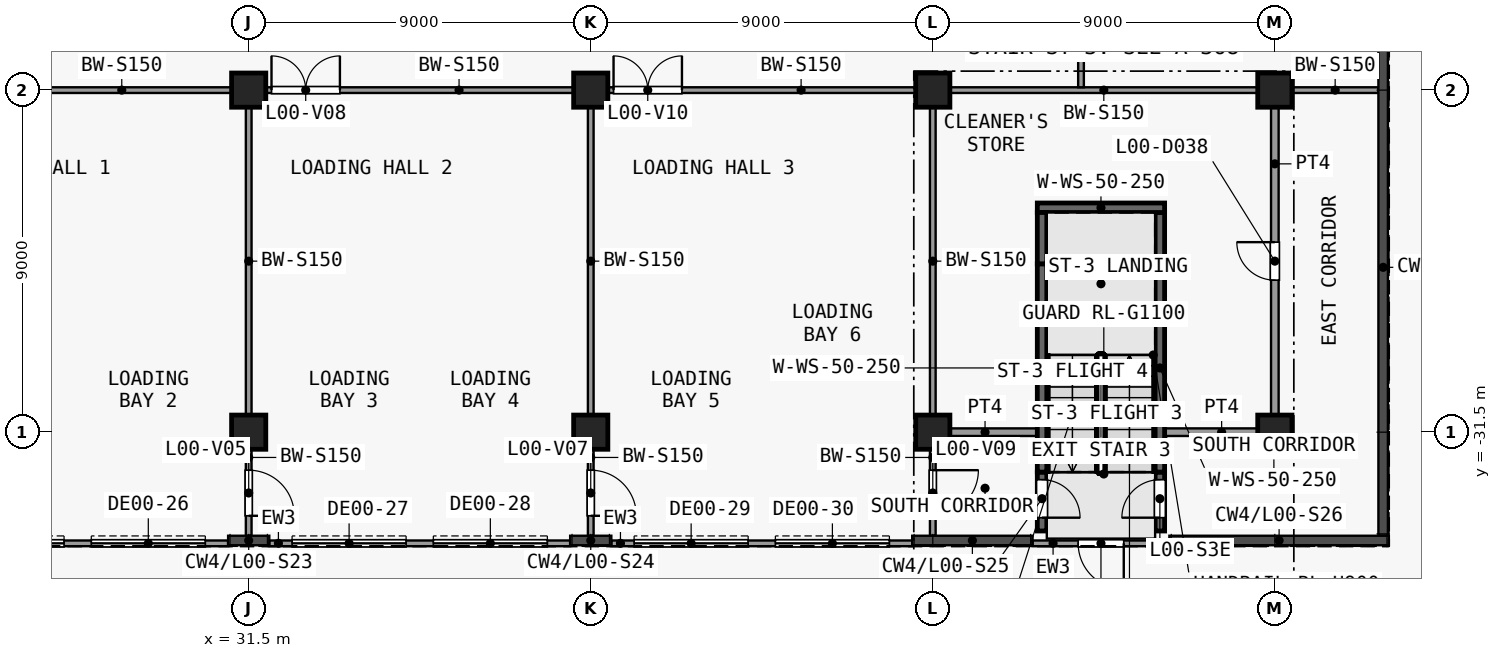
"""IFC4 building model, lengths in metres.
Left out: names, types, materials, properties, quantities, classifications, styles, units other than length and angle.
Written with IfcOpenShell. Run it as: python <this file> out.ifc"""

import sys

from ifc_helpers import new_model, si_unit, direction, frame, frame_2d, origin, origin_2d, place, context, subcontext, project, spatial, rectangle, extrude, element, fill, save


model = new_model("IFC4")
c1 = context("Model", 3, precision=1e-05, world=origin(), true_north=direction((0.0, 1.0)))
c2 = subcontext(c1, "Body", "Model", "MODEL_VIEW")
j1 = project(units=[si_unit("LENGTHUNIT", "METRE"), si_unit("PLANEANGLEUNIT", "RADIAN")], contexts=[c1])
p1 = place(None, origin())
s1 = spatial("IfcSite", under=j1, at=p1, CompositionType="ELEMENT")
p2 = place(p1, origin())
s2 = spatial("IfcBuilding", under=s1, at=p2, CompositionType="ELEMENT")
p3 = place(p2, origin())
s3 = spatial("IfcBuildingStorey", under=s2, at=p3, CompositionType="ELEMENT", Elevation=0.0)
for number, where, z_axis, x_axis in (
    (1, (31.5, -31.5, 0.0), (0.0, 0.0, 1.0), (1.0, 0.0, 0.0)),
    (2, (31.5, -22.5, 0.0), (0.0, 0.0, 1.0), (1.0, 0.0, 0.0)),
    (3, (40.5, -31.5, 0.0), (0.0, 0.0, 1.0), (1.0, 0.0, 0.0)),
    (4, (40.5, -22.5, 0.0), (0.0, 0.0, 1.0), (1.0, 0.0, 0.0)),
    (5, (49.5, -31.5, 0.0), (0.0, 0.0, 1.0), (1.0, 0.0, 0.0)),
    (6, (49.5, -22.5, 0.0), (0.0, 0.0, 1.0), (1.0, 0.0, 0.0)),
    (7, (58.5, -31.5, 0.0), (0.0, 0.0, 1.0), (1.0, 0.0, 0.0)),
    (8, (58.5, -22.5, 0.0), (0.0, 0.0, 1.0), (1.0, 0.0, 0.0)),
):
    element("IfcColumn", number, at=place(p3, frame(where, z_axis=z_axis, x_axis=x_axis)), inside=s3, PredefinedType="COLUMN", context=c2, shape_type="SweptSolid", body=[
        extrude(rectangle(XDim=0.9, YDim=0.9, at=origin_2d()), origin(), (0.0, 0.0, 1.0), 8.0),
    ])
p4 = place(p3, frame((23.25, -22.5, 0.0), z_axis=(0.0, 0.0, 1.0), x_axis=(1.0, 0.0, 0.0)))
e9 = element("IfcWall", 9, at=p4, inside=s3, PredefinedType="PARTITIONING", context=c2, shape_type="SweptSolid", body=[
    extrude(rectangle(XDim=7.8, YDim=0.15, at=frame_2d((3.9, 0.0))), origin(), (0.0, 0.0, 1.0), 7.65),
])
p5 = place(p4, frame((0.1, 0.0, 0.0)))
e10 = element("IfcOpeningElement", 10, at=p5, cuts=e9, PredefinedType="OPENING", context=c2, shape_type="SweptSolid", body=[
    extrude(rectangle(XDim=1.8, YDim=2.1, at=frame_2d((0.9, 1.05))), frame((0.0, 0.085, 0.0), z_axis=(0.0, -1.0, 0.0), x_axis=(1.0, 0.0, 0.0)), (0.0, 0.0, 1.0), 0.17),
])
p6 = place(p3, frame((31.95, -22.5, 0.0), z_axis=(0.0, 0.0, 1.0), x_axis=(1.0, 0.0, 0.0)))
e11 = element("IfcWall", 11, at=p6, inside=s3, PredefinedType="PARTITIONING", context=c2, shape_type="SweptSolid", body=[
    extrude(rectangle(XDim=8.1, YDim=0.15, at=frame_2d((4.05, 0.0))), origin(), (0.0, 0.0, 1.0), 7.65),
])
p7 = place(p6, frame((0.15, 0.0, 0.0)))
e12 = element("IfcOpeningElement", 12, at=p7, cuts=e11, PredefinedType="OPENING", context=c2, shape_type="SweptSolid", body=[
    extrude(rectangle(XDim=1.8, YDim=2.1, at=frame_2d((0.9, 1.05))), frame((0.0, 0.085, 0.0), z_axis=(0.0, -1.0, 0.0), x_axis=(1.0, 0.0, 0.0)), (0.0, 0.0, 1.0), 0.17),
])
p8 = place(p3, frame((40.95, -22.5, 0.0), z_axis=(0.0, 0.0, 1.0), x_axis=(1.0, 0.0, 0.0)))
e13 = element("IfcWall", 13, at=p8, inside=s3, PredefinedType="PARTITIONING", context=c2, shape_type="SweptSolid", body=[
    extrude(rectangle(XDim=8.1, YDim=0.15, at=frame_2d((4.05, 0.0))), origin(), (0.0, 0.0, 1.0), 7.65),
])
p9 = place(p8, frame((0.15, 0.0, 0.0)))
e14 = element("IfcOpeningElement", 14, at=p9, cuts=e13, PredefinedType="OPENING", context=c2, shape_type="SweptSolid", body=[
    extrude(rectangle(XDim=1.8, YDim=2.1, at=frame_2d((0.9, 1.05))), frame((0.0, 0.085, 0.0), z_axis=(0.0, -1.0, 0.0), x_axis=(1.0, 0.0, 0.0)), (0.0, 0.0, 1.0), 0.17),
])
p10 = place(p3, frame((49.95, -22.5, 0.0), z_axis=(0.0, 0.0, 1.0), x_axis=(1.0, 0.0, 0.0)))
e15 = element("IfcWall", 15, at=p10, inside=s3, PredefinedType="PARTITIONING", context=c2, shape_type="SweptSolid", body=[
    extrude(rectangle(XDim=8.1, YDim=0.15, at=frame_2d((4.05, 0.0))), origin(), (0.0, 0.0, 1.0), 7.65),
])
p11 = place(p3, frame((58.95, -22.5, 0.0), z_axis=(0.0, 0.0, 1.0), x_axis=(1.0, 0.0, 0.0)))
e16 = element("IfcWall", 16, at=p11, inside=s3, PredefinedType="PARTITIONING", context=c2, shape_type="SweptSolid", body=[
    extrude(rectangle(XDim=2.275, YDim=0.15, at=frame_2d((1.138, 0.0))), origin(), (0.0, 0.0, 1.0), 7.65),
])
p12 = place(p3, frame((31.5, -31.95, 0.0), z_axis=(0.0, 0.0, 1.0), x_axis=(0.0, -1.0, 0.0)))
e17 = element("IfcWall", 17, at=p12, inside=s3, PredefinedType="PARTITIONING", context=c2, shape_type="SweptSolid", body=[
    extrude(rectangle(XDim=2.275, YDim=0.15, at=frame_2d((1.138, 0.0))), origin(), (0.0, 0.0, 1.0), 7.65),
])
p13 = place(p12, frame((0.55, 0.0, 0.0)))
e18 = element("IfcOpeningElement", 18, at=p13, cuts=e17, PredefinedType="OPENING", context=c2, shape_type="SweptSolid", body=[
    extrude(rectangle(XDim=1.2, YDim=2.1, at=frame_2d((0.6, 1.05))), frame((0.0, 0.085, 0.0), z_axis=(0.0, -1.0, 0.0), x_axis=(1.0, 0.0, 0.0)), (0.0, 0.0, 1.0), 0.17),
])
p14 = place(p3, frame((31.5, -31.05, 0.0), z_axis=(0.0, 0.0, 1.0), x_axis=(0.0, 1.0, 0.0)))
e19 = element("IfcWall", 19, at=p14, inside=s3, PredefinedType="PARTITIONING", context=c2, shape_type="SweptSolid", body=[
    extrude(rectangle(XDim=8.1, YDim=0.15, at=frame_2d((4.05, 0.0))), origin(), (0.0, 0.0, 1.0), 7.65),
])
p15 = place(p3, frame((40.5, -31.95, 0.0), z_axis=(0.0, 0.0, 1.0), x_axis=(0.0, -1.0, 0.0)))
e20 = element("IfcWall", 20, at=p15, inside=s3, PredefinedType="PARTITIONING", context=c2, shape_type="SweptSolid", body=[
    extrude(rectangle(XDim=2.275, YDim=0.15, at=frame_2d((1.138, 0.0))), origin(), (0.0, 0.0, 1.0), 7.65),
])
p16 = place(p15, frame((0.55, 0.0, 0.0)))
e21 = element("IfcOpeningElement", 21, at=p16, cuts=e20, PredefinedType="OPENING", context=c2, shape_type="SweptSolid", body=[
    extrude(rectangle(XDim=1.2, YDim=2.1, at=frame_2d((0.6, 1.05))), frame((0.0, 0.085, 0.0), z_axis=(0.0, -1.0, 0.0), x_axis=(1.0, 0.0, 0.0)), (0.0, 0.0, 1.0), 0.17),
])
p17 = place(p3, frame((40.5, -31.05, 0.0), z_axis=(0.0, 0.0, 1.0), x_axis=(0.0, 1.0, 0.0)))
e22 = element("IfcWall", 22, at=p17, inside=s3, PredefinedType="PARTITIONING", context=c2, shape_type="SweptSolid", body=[
    extrude(rectangle(XDim=8.1, YDim=0.15, at=frame_2d((4.05, 0.0))), origin(), (0.0, 0.0, 1.0), 7.65),
])
p18 = place(p3, frame((49.5, -31.95, 0.0), z_axis=(0.0, 0.0, 1.0), x_axis=(0.0, -1.0, 0.0)))
e23 = element("IfcWall", 23, at=p18, inside=s3, PredefinedType="PARTITIONING", context=c2, shape_type="SweptSolid", body=[
    extrude(rectangle(XDim=2.275, YDim=0.15, at=frame_2d((1.138, 0.0))), origin(), (0.0, 0.0, 1.0), 7.65),
])
p19 = place(p18, frame((0.55, 0.0, 0.0)))
e24 = element("IfcOpeningElement", 24, at=p19, cuts=e23, PredefinedType="OPENING", context=c2, shape_type="SweptSolid", body=[
    extrude(rectangle(XDim=1.2, YDim=2.1, at=frame_2d((0.6, 1.05))), frame((0.0, 0.085, 0.0), z_axis=(0.0, -1.0, 0.0), x_axis=(1.0, 0.0, 0.0)), (0.0, 0.0, 1.0), 0.17),
])
p20 = place(p3, frame((49.5, -31.05, 0.0), z_axis=(0.0, 0.0, 1.0), x_axis=(0.0, 1.0, 0.0)))
e25 = element("IfcWall", 25, at=p20, inside=s3, PredefinedType="PARTITIONING", context=c2, shape_type="SweptSolid", body=[
    extrude(rectangle(XDim=8.1, YDim=0.15, at=frame_2d((4.05, 0.0))), origin(), (0.0, 0.0, 1.0), 7.65),
])
p21 = place(p3, frame((53.4, -22.425, 0.0), z_axis=(0.0, 0.0, 1.0), x_axis=(0.0, 1.0, 0.0)))
e26 = element("IfcWall", 26, at=p21, inside=s3, PredefinedType="PARTITIONING", context=c2, shape_type="SweptSolid", body=[
    extrude(rectangle(XDim=8.85, YDim=0.15, at=frame_2d((4.425, 0.0))), origin(), (0.0, 0.0, 1.0), 7.65),
])
p22 = place(p21, frame((3.525, 0.0, 0.0)))
e27 = element("IfcOpeningElement", 27, at=p22, cuts=e26, PredefinedType="OPENING", context=c2, shape_type="SweptSolid", body=[
    extrude(rectangle(XDim=1.8, YDim=2.1, at=frame_2d((0.9, 1.05))), frame((0.0, 0.085, 0.0), z_axis=(0.0, -1.0, 0.0), x_axis=(1.0, 0.0, 0.0)), (0.0, 0.0, 1.0), 0.17),
])
p23 = place(p3, frame((55.725, -34.425, 0.0), z_axis=(0.0, 0.0, 1.0), x_axis=(-1.0, 0.0, 0.0)))
e28 = element("IfcWall", 28, at=p23, inside=s3, PredefinedType="SOLIDWALL", context=c2, shape_type="SweptSolid", body=[
    extrude(rectangle(XDim=3.6, YDim=0.15, at=frame_2d((1.8, 0.0))), origin(), (0.0, 0.0, 1.0), 7.65),
])
p24 = place(p23, frame((1.2, 0.0, 0.0)))
e29 = element("IfcOpeningElement", 29, at=p24, cuts=e28, PredefinedType="OPENING", context=c2, shape_type="SweptSolid", body=[
    extrude(rectangle(XDim=1.2, YDim=2.4, at=frame_2d((0.6, 1.2))), frame((0.0, 0.085, 0.0), z_axis=(0.0, -1.0, 0.0), x_axis=(1.0, 0.0, 0.0)), (0.0, 0.0, 1.0), 0.17),
])
p25 = place(p3, frame((30.958, -34.425, 0.0), z_axis=(0.0, 0.0, 1.0), x_axis=(-1.0, 0.0, 0.0)))
e30 = element("IfcWall", 30, at=p25, inside=s3, PredefinedType="SOLIDWALL", context=c2, shape_type="SweptSolid", body=[
    extrude(rectangle(XDim=7.917, YDim=0.15, at=frame_2d((3.958, 0.0))), origin(), (0.0, 0.0, 1.0), 7.65),
])
p26 = place(p25, frame((4.317, 0.0, 0.0)))
e31 = element("IfcOpeningElement", 31, at=p26, cuts=e30, PredefinedType="OPENING", context=c2, shape_type="SweptSolid", body=[
    extrude(rectangle(XDim=3.0, YDim=4.3, at=frame_2d((1.5, 2.15))), frame((0.0, 0.085, 0.0), z_axis=(0.0, -1.0, 0.0), x_axis=(1.0, 0.0, 0.0)), (0.0, 0.0, 1.0), 0.17),
])
p27 = place(p25, frame((0.6, 0.0, 0.0)))
e32 = element("IfcOpeningElement", 32, at=p27, cuts=e30, PredefinedType="OPENING", context=c2, shape_type="SweptSolid", body=[
    extrude(rectangle(XDim=3.0, YDim=4.3, at=frame_2d((1.5, 2.15))), frame((0.0, 0.085, 0.0), z_axis=(0.0, -1.0, 0.0), x_axis=(1.0, 0.0, 0.0)), (0.0, 0.0, 1.0), 0.17),
])
p28 = place(p3, frame((39.958, -34.425, 0.0), z_axis=(0.0, 0.0, 1.0), x_axis=(-1.0, 0.0, 0.0)))
e33 = element("IfcWall", 33, at=p28, inside=s3, PredefinedType="SOLIDWALL", context=c2, shape_type="SweptSolid", body=[
    extrude(rectangle(XDim=7.917, YDim=0.15, at=frame_2d((3.958, 0.0))), origin(), (0.0, 0.0, 1.0), 7.65),
])
p29 = place(p28, frame((4.317, 0.0, 0.0)))
e34 = element("IfcOpeningElement", 34, at=p29, cuts=e33, PredefinedType="OPENING", context=c2, shape_type="SweptSolid", body=[
    extrude(rectangle(XDim=3.0, YDim=4.3, at=frame_2d((1.5, 2.15))), frame((0.0, 0.085, 0.0), z_axis=(0.0, -1.0, 0.0), x_axis=(1.0, 0.0, 0.0)), (0.0, 0.0, 1.0), 0.17),
])
p30 = place(p28, frame((0.6, 0.0, 0.0)))
e35 = element("IfcOpeningElement", 35, at=p30, cuts=e33, PredefinedType="OPENING", context=c2, shape_type="SweptSolid", body=[
    extrude(rectangle(XDim=3.0, YDim=4.3, at=frame_2d((1.5, 2.15))), frame((0.0, 0.085, 0.0), z_axis=(0.0, -1.0, 0.0), x_axis=(1.0, 0.0, 0.0)), (0.0, 0.0, 1.0), 0.17),
])
p31 = place(p3, frame((48.958, -34.425, 0.0), z_axis=(0.0, 0.0, 1.0), x_axis=(-1.0, 0.0, 0.0)))
e36 = element("IfcWall", 36, at=p31, inside=s3, PredefinedType="SOLIDWALL", context=c2, shape_type="SweptSolid", body=[
    extrude(rectangle(XDim=7.917, YDim=0.15, at=frame_2d((3.958, 0.0))), origin(), (0.0, 0.0, 1.0), 7.65),
])
p32 = place(p31, frame((4.317, 0.0, 0.0)))
e37 = element("IfcOpeningElement", 37, at=p32, cuts=e36, PredefinedType="OPENING", context=c2, shape_type="SweptSolid", body=[
    extrude(rectangle(XDim=3.0, YDim=4.3, at=frame_2d((1.5, 2.15))), frame((0.0, 0.085, 0.0), z_axis=(0.0, -1.0, 0.0), x_axis=(1.0, 0.0, 0.0)), (0.0, 0.0, 1.0), 0.17),
])
p33 = place(p31, frame((0.6, 0.0, 0.0)))
e38 = element("IfcOpeningElement", 38, at=p33, cuts=e36, PredefinedType="OPENING", context=c2, shape_type="SweptSolid", body=[
    extrude(rectangle(XDim=3.0, YDim=4.3, at=frame_2d((1.5, 2.15))), frame((0.0, 0.085, 0.0), z_axis=(0.0, -1.0, 0.0), x_axis=(1.0, 0.0, 0.0)), (0.0, 0.0, 1.0), 0.17),
])
p34 = place(p3, frame((52.375, -32.55, 0.0), z_axis=(0.0, 0.0, 1.0), x_axis=(0.0, -1.0, 0.0)))
e39 = element("IfcWall", 39, at=p34, inside=s3, PredefinedType="SHEAR", context=c2, shape_type="SweptSolid", body=[
    extrude(rectangle(XDim=1.55, YDim=0.25, at=frame_2d((0.775, 0.0))), origin(), (0.0, 0.0, 1.0), 7.65),
])
p35 = place(p34, frame((0.2, 0.0, 0.0)))
e40 = element("IfcOpeningElement", 40, at=p35, cuts=e39, PredefinedType="OPENING", context=c2, shape_type="SweptSolid", body=[
    extrude(rectangle(XDim=1.0, YDim=2.1, at=frame_2d((0.5, 1.05))), frame((0.0, 0.135, 0.0), z_axis=(0.0, -1.0, 0.0), x_axis=(1.0, 0.0, 0.0)), (0.0, 0.0, 1.0), 0.27),
])
p36 = place(p3, frame((52.375, -32.55, 0.0), z_axis=(0.0, 0.0, 1.0), x_axis=(0.0, 1.0, 0.0)))
e41 = element("IfcWall", 41, at=p36, inside=s3, PredefinedType="SHEAR", context=c2, shape_type="SweptSolid", body=[
    extrude(rectangle(XDim=5.48, YDim=0.25, at=frame_2d((2.74, 0.0))), origin(), (0.0, 0.0, 1.0), 7.65),
])
p37 = place(p3, frame((52.375, -27.07, 0.0), z_axis=(0.0, 0.0, 1.0), x_axis=(0.0, 1.0, 0.0)))
e42 = element("IfcWall", 42, at=p37, inside=s3, PredefinedType="SHEAR", context=c2, shape_type="SweptSolid", body=[
    extrude(rectangle(XDim=1.35, YDim=0.25, at=frame_2d((0.675, 0.0))), origin(), (0.0, 0.0, 1.0), 7.65),
])
p38 = place(p3, frame((55.475, -34.1, 0.0), z_axis=(0.0, 0.0, 1.0), x_axis=(0.0, 1.0, 0.0)))
e43 = element("IfcWall", 43, at=p38, inside=s3, PredefinedType="SHEAR", context=c2, shape_type="SweptSolid", body=[
    extrude(rectangle(XDim=1.55, YDim=0.25, at=frame_2d((0.775, 0.0))), origin(), (0.0, 0.0, 1.0), 7.65),
])
p39 = place(p38, frame((0.35, 0.0, 0.0)))
e44 = element("IfcOpeningElement", 44, at=p39, cuts=e43, PredefinedType="OPENING", context=c2, shape_type="SweptSolid", body=[
    extrude(rectangle(XDim=1.0, YDim=2.1, at=frame_2d((0.5, 1.05))), frame((0.0, 0.135, 0.0), z_axis=(0.0, -1.0, 0.0), x_axis=(1.0, 0.0, 0.0)), (0.0, 0.0, 1.0), 0.27),
])
p40 = place(p3, frame((55.475, -32.55, 0.0), z_axis=(0.0, 0.0, 1.0), x_axis=(0.0, 1.0, 0.0)))
e45 = element("IfcWall", 45, at=p40, inside=s3, PredefinedType="SHEAR", context=c2, shape_type="SweptSolid", body=[
    extrude(rectangle(XDim=5.48, YDim=0.25, at=frame_2d((2.74, 0.0))), origin(), (0.0, 0.0, 1.0), 7.65),
])
p41 = place(p3, frame((55.475, -27.07, 0.0), z_axis=(0.0, 0.0, 1.0), x_axis=(0.0, 1.0, 0.0)))
e46 = element("IfcWall", 46, at=p41, inside=s3, PredefinedType="SHEAR", context=c2, shape_type="SweptSolid", body=[
    extrude(rectangle(XDim=1.35, YDim=0.25, at=frame_2d((0.675, 0.0))), origin(), (0.0, 0.0, 1.0), 7.65),
])
p42 = place(p3, frame((52.25, -25.595, 0.0), z_axis=(0.0, 0.0, 1.0), x_axis=(1.0, 0.0, 0.0)))
e47 = element("IfcWall", 47, at=p42, inside=s3, PredefinedType="SHEAR", context=c2, shape_type="SweptSolid", body=[
    extrude(rectangle(XDim=3.35, YDim=0.25, at=frame_2d((1.675, 0.0))), origin(), (0.0, 0.0, 1.0), 7.65),
])
p43 = place(p3, frame((49.5, -31.5, 0.0), z_axis=(0.0, 0.0, 1.0), x_axis=(1.0, 0.0, 0.0)))
e48 = element("IfcWall", 48, at=p43, inside=s3, PredefinedType="PARTITIONING", context=c2, shape_type="SweptSolid", body=[
    extrude(rectangle(XDim=2.75, YDim=0.2, at=frame_2d((1.375, 0.0))), origin(), (0.0, 0.0, 1.0), 7.65),
])
p44 = place(p3, frame((55.6, -31.5, 0.0), z_axis=(0.0, 0.0, 1.0), x_axis=(1.0, 0.0, 0.0)))
e49 = element("IfcWall", 49, at=p44, inside=s3, PredefinedType="PARTITIONING", context=c2, shape_type="SweptSolid", body=[
    extrude(rectangle(XDim=3.0, YDim=0.2, at=frame_2d((1.5, 0.0))), origin(), (0.0, 0.0, 1.0), 7.65),
])
p45 = place(p3, frame((58.5, -31.4, 0.0), z_axis=(0.0, 0.0, 1.0), x_axis=(0.0, 1.0, 0.0)))
e50 = element("IfcWall", 50, at=p45, inside=s3, PredefinedType="PARTITIONING", context=c2, shape_type="SweptSolid", body=[
    extrude(rectangle(XDim=8.9, YDim=0.2, at=frame_2d((4.45, 0.0))), origin(), (0.0, 0.0, 1.0), 7.65),
])
p46 = place(p45, frame((3.9, 0.0, 0.0)))
e51 = element("IfcOpeningElement", 51, at=p46, cuts=e50, PredefinedType="OPENING", context=c2, shape_type="SweptSolid", body=[
    extrude(rectangle(XDim=1.0, YDim=2.1, at=frame_2d((0.5, 1.05))), frame((0.0, 0.11, 0.0), z_axis=(0.0, -1.0, 0.0), x_axis=(1.0, 0.0, 0.0)), (0.0, 0.0, 1.0), 0.22),
])
p47 = place(p13, origin())
e52 = element("IfcDoor", 52, at=p47, inside=s3, OperationType="SINGLE_SWING_RIGHT", PredefinedType="DOOR", context=c2, shape_type="SweptSolid", body=[
    extrude(rectangle(XDim=1.2, YDim=2.1, at=frame_2d((0.6, 1.05))), frame((0.0, 0.025, 0.0), z_axis=(0.0, -1.0, 0.0), x_axis=(1.0, 0.0, 0.0)), (0.0, 0.0, 1.0), 0.05),
])
fill(e18, e52)
p48 = place(p16, origin())
e53 = element("IfcDoor", 53, at=p48, inside=s3, OperationType="SINGLE_SWING_RIGHT", PredefinedType="DOOR", context=c2, shape_type="SweptSolid", body=[
    extrude(rectangle(XDim=1.2, YDim=2.1, at=frame_2d((0.6, 1.05))), frame((0.0, 0.025, 0.0), z_axis=(0.0, -1.0, 0.0), x_axis=(1.0, 0.0, 0.0)), (0.0, 0.0, 1.0), 0.05),
])
fill(e21, e53)
p49 = place(p7, origin())
e54 = element("IfcDoor", 54, at=p49, inside=s3, OperationType="DOUBLE_DOOR_SINGLE_SWING", PredefinedType="DOOR", context=c2, shape_type="SweptSolid", body=[
    extrude(rectangle(XDim=1.8, YDim=2.1, at=frame_2d((0.9, 1.05))), frame((0.0, 0.025, 0.0), z_axis=(0.0, -1.0, 0.0), x_axis=(1.0, 0.0, 0.0)), (0.0, 0.0, 1.0), 0.05),
])
fill(e12, e54)
p50 = place(p19, origin())
e55 = element("IfcDoor", 55, at=p50, inside=s3, OperationType="SINGLE_SWING_LEFT", PredefinedType="DOOR", context=c2, shape_type="SweptSolid", body=[
    extrude(rectangle(XDim=1.2, YDim=2.1, at=frame_2d((0.6, 1.05))), frame((0.0, 0.025, 0.0), z_axis=(0.0, -1.0, 0.0), x_axis=(1.0, 0.0, 0.0)), (0.0, 0.0, 1.0), 0.05),
])
fill(e24, e55)
p51 = place(p9, origin())
e56 = element("IfcDoor", 56, at=p51, inside=s3, OperationType="DOUBLE_DOOR_SINGLE_SWING", PredefinedType="DOOR", context=c2, shape_type="SweptSolid", body=[
    extrude(rectangle(XDim=1.8, YDim=2.1, at=frame_2d((0.9, 1.05))), frame((0.0, 0.025, 0.0), z_axis=(0.0, -1.0, 0.0), x_axis=(1.0, 0.0, 0.0)), (0.0, 0.0, 1.0), 0.05),
])
fill(e14, e56)
p52 = place(p24, origin())
e57 = element("IfcDoor", 57, at=p52, inside=s3, OperationType="SINGLE_SWING_LEFT", PredefinedType="DOOR", context=c2, shape_type="SweptSolid", body=[
    extrude(rectangle(XDim=1.2, YDim=2.4, at=frame_2d((0.6, 1.2))), frame((0.0, 0.025, 0.0), z_axis=(0.0, -1.0, 0.0), x_axis=(1.0, 0.0, 0.0)), (0.0, 0.0, 1.0), 0.05),
])
fill(e29, e57)
p53 = place(p26, origin())
e58 = element("IfcDoor", 58, at=p53, inside=s3, OperationType="ROLLINGUP", PredefinedType="DOOR", context=c2, shape_type="SweptSolid", body=[
    extrude(rectangle(XDim=3.0, YDim=4.3, at=frame_2d((1.5, 2.15))), frame((0.0, 0.025, 0.0), z_axis=(0.0, -1.0, 0.0), x_axis=(1.0, 0.0, 0.0)), (0.0, 0.0, 1.0), 0.05),
])
fill(e31, e58)
p54 = place(p27, origin())
e59 = element("IfcDoor", 59, at=p54, inside=s3, OperationType="ROLLINGUP", PredefinedType="DOOR", context=c2, shape_type="SweptSolid", body=[
    extrude(rectangle(XDim=3.0, YDim=4.3, at=frame_2d((1.5, 2.15))), frame((0.0, 0.025, 0.0), z_axis=(0.0, -1.0, 0.0), x_axis=(1.0, 0.0, 0.0)), (0.0, 0.0, 1.0), 0.05),
])
fill(e32, e59)
p55 = place(p29, origin())
e60 = element("IfcDoor", 60, at=p55, inside=s3, OperationType="ROLLINGUP", PredefinedType="DOOR", context=c2, shape_type="SweptSolid", body=[
    extrude(rectangle(XDim=3.0, YDim=4.3, at=frame_2d((1.5, 2.15))), frame((0.0, 0.025, 0.0), z_axis=(0.0, -1.0, 0.0), x_axis=(1.0, 0.0, 0.0)), (0.0, 0.0, 1.0), 0.05),
])
fill(e34, e60)
p56 = place(p30, origin())
e61 = element("IfcDoor", 61, at=p56, inside=s3, OperationType="ROLLINGUP", PredefinedType="DOOR", context=c2, shape_type="SweptSolid", body=[
    extrude(rectangle(XDim=3.0, YDim=4.3, at=frame_2d((1.5, 2.15))), frame((0.0, 0.025, 0.0), z_axis=(0.0, -1.0, 0.0), x_axis=(1.0, 0.0, 0.0)), (0.0, 0.0, 1.0), 0.05),
])
fill(e35, e61)
p57 = place(p32, origin())
e62 = element("IfcDoor", 62, at=p57, inside=s3, OperationType="ROLLINGUP", PredefinedType="DOOR", context=c2, shape_type="SweptSolid", body=[
    extrude(rectangle(XDim=3.0, YDim=4.3, at=frame_2d((1.5, 2.15))), frame((0.0, 0.025, 0.0), z_axis=(0.0, -1.0, 0.0), x_axis=(1.0, 0.0, 0.0)), (0.0, 0.0, 1.0), 0.05),
])
fill(e37, e62)
p58 = place(p33, origin())
e63 = element("IfcDoor", 63, at=p58, inside=s3, OperationType="ROLLINGUP", PredefinedType="DOOR", context=c2, shape_type="SweptSolid", body=[
    extrude(rectangle(XDim=3.0, YDim=4.3, at=frame_2d((1.5, 2.15))), frame((0.0, 0.025, 0.0), z_axis=(0.0, -1.0, 0.0), x_axis=(1.0, 0.0, 0.0)), (0.0, 0.0, 1.0), 0.05),
])
fill(e38, e63)
p59 = place(p35, origin())
e64 = element("IfcDoor", 64, at=p59, inside=s3, OperationType="SINGLE_SWING_RIGHT", PredefinedType="DOOR", context=c2, shape_type="SweptSolid", body=[
    extrude(rectangle(XDim=1.0, YDim=2.1, at=frame_2d((0.5, 1.05))), frame((0.0, 0.025, 0.0), z_axis=(0.0, -1.0, 0.0), x_axis=(1.0, 0.0, 0.0)), (0.0, 0.0, 1.0), 0.05),
])
fill(e40, e64)
p60 = place(p39, origin())
e65 = element("IfcDoor", 65, at=p60, inside=s3, OperationType="SINGLE_SWING_LEFT", PredefinedType="DOOR", context=c2, shape_type="SweptSolid", body=[
    extrude(rectangle(XDim=1.0, YDim=2.1, at=frame_2d((0.5, 1.05))), frame((0.0, 0.025, 0.0), z_axis=(0.0, -1.0, 0.0), x_axis=(1.0, 0.0, 0.0)), (0.0, 0.0, 1.0), 0.05),
])
fill(e44, e65)
p61 = place(p46, origin())
e66 = element("IfcDoor", 66, at=p61, inside=s3, OperationType="SINGLE_SWING_LEFT", PredefinedType="DOOR", context=c2, shape_type="SweptSolid", body=[
    extrude(rectangle(XDim=1.0, YDim=2.1, at=frame_2d((0.5, 1.05))), frame((0.0, 0.025, 0.0), z_axis=(0.0, -1.0, 0.0), x_axis=(1.0, 0.0, 0.0)), (0.0, 0.0, 1.0), 0.05),
])
fill(e51, e66)
save(model, sys.argv[1])
